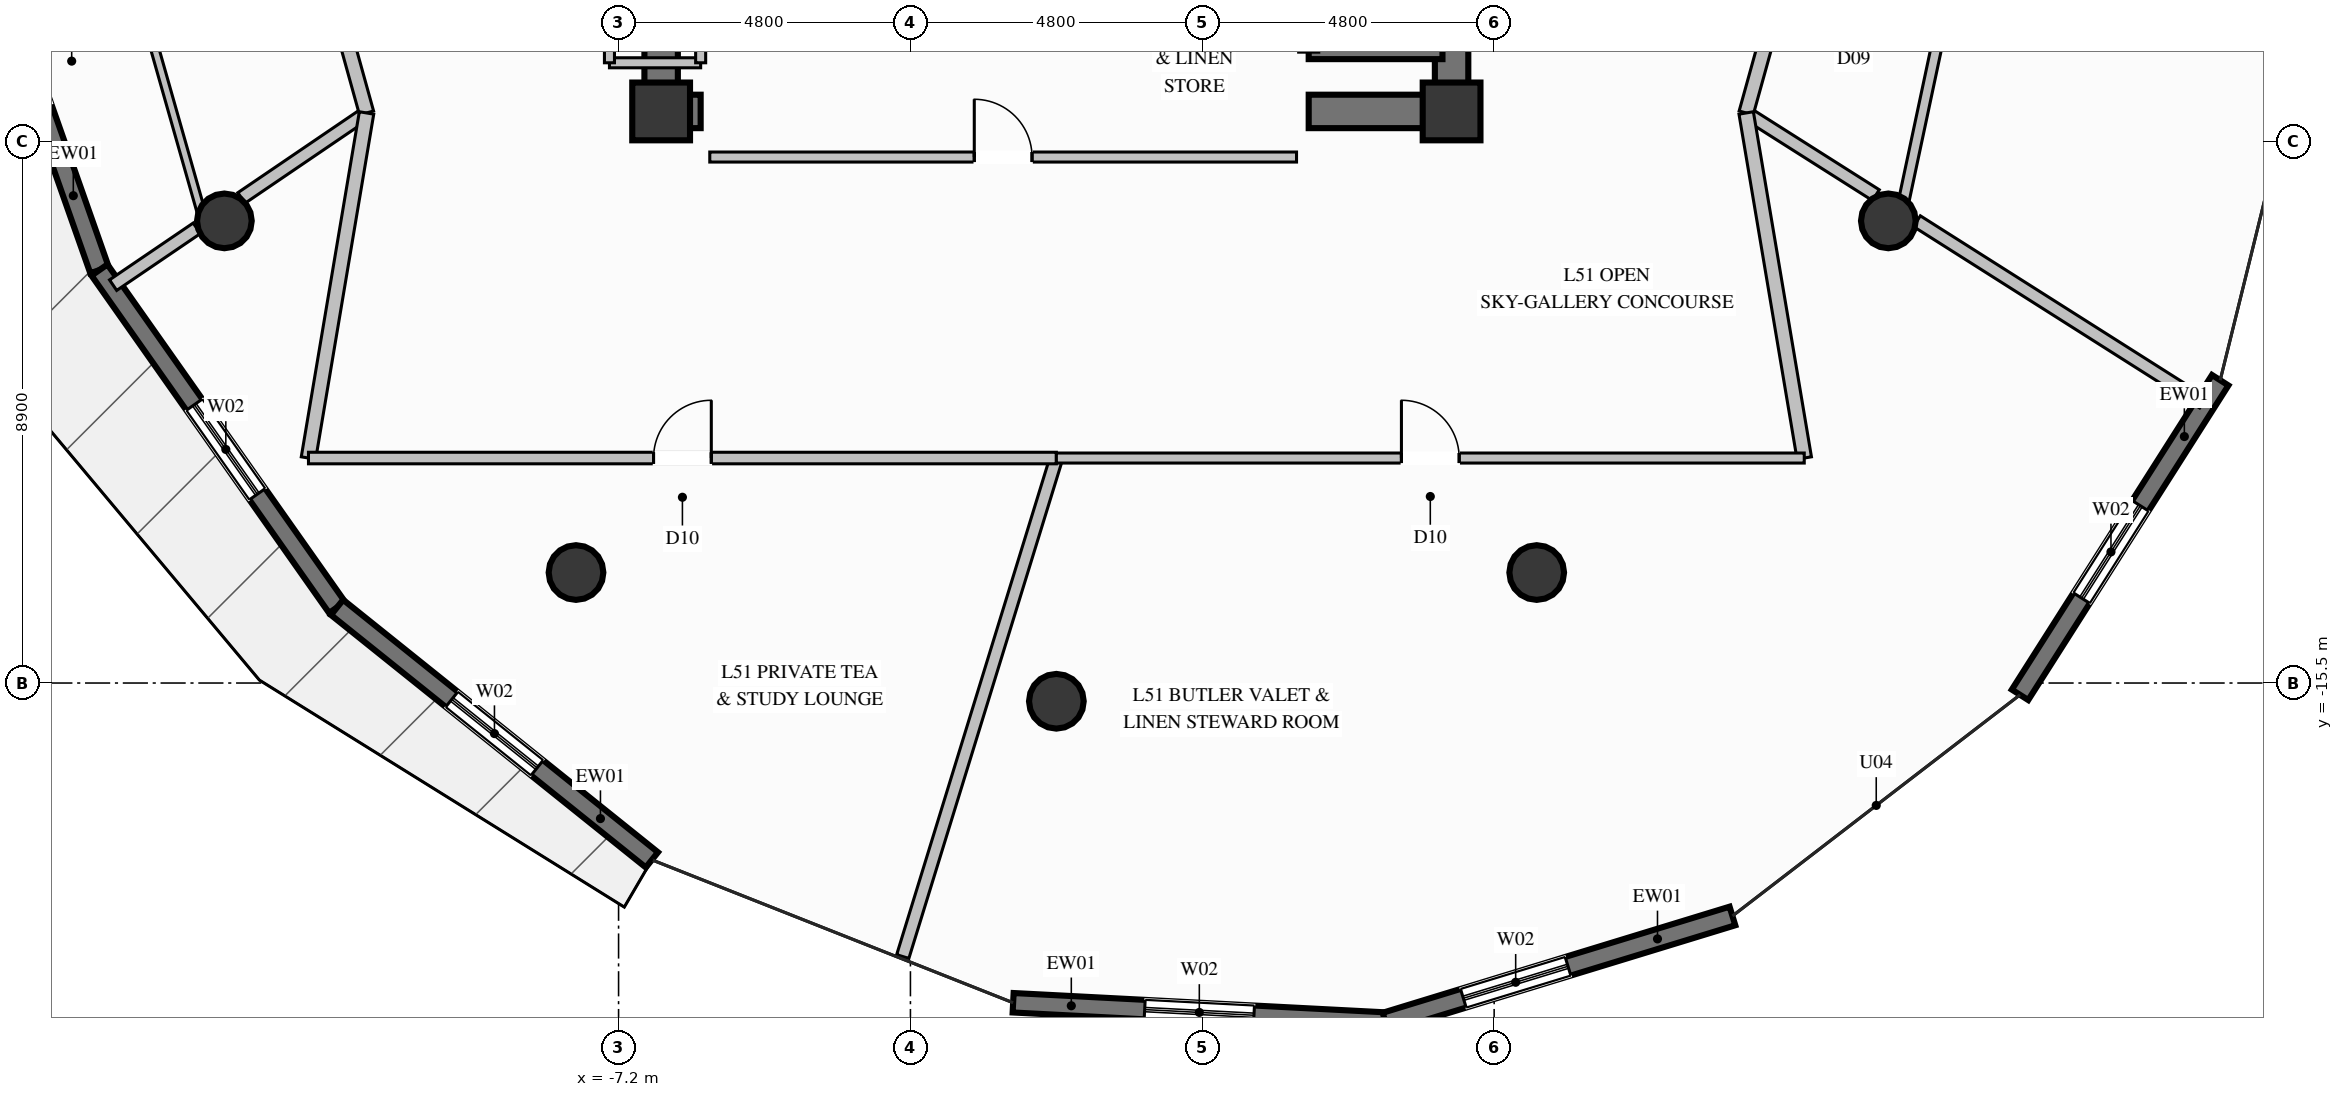
"""IFC4 building model, lengths in metres.
Left out: names, types, materials, properties, quantities, classifications, styles, units other than length and angle.
Written with IfcOpenShell. Run it as: python <this file> out.ifc"""

import sys

from ifc_helpers import new_model, si_unit, direction, frame, frame_2d, origin, origin_2d, place, context, subcontext, project, spatial, rectangle, circle, extrude, element, fill, save


model = new_model("IFC4")
c1 = context("Model", 3, precision=1e-05, world=origin(), true_north=direction((0.0, 1.0)))
c2 = subcontext(c1, "Body", "Model", "MODEL_VIEW")
j1 = project(units=[si_unit("LENGTHUNIT", "METRE"), si_unit("PLANEANGLEUNIT", "RADIAN")], contexts=[c1])
p1 = place(None, origin())
s1 = spatial("IfcSite", under=j1, at=p1, CompositionType="ELEMENT")
p2 = place(p1, origin())
s2 = spatial("IfcBuilding", under=s1, at=p2, CompositionType="ELEMENT")
p3 = place(p2, frame((0.0, 0.0, 198.4)))
s3 = spatial("IfcBuildingStorey", under=s2, at=p3, CompositionType="ELEMENT", Elevation=198.4)
for number, where, z_axis, x_axis in (
    (1, (-6.5, -6.1, 0.0), (0.0, 0.0, 1.0), (1.0, 0.0, 0.0)),
    (2, (6.5, -6.1, 0.0), (0.0, 0.0, 1.0), (1.0, 0.0, 0.0)),
):
    element("IfcColumn", number, at=place(p3, frame(where, z_axis=z_axis, x_axis=x_axis)), inside=s3, PredefinedType="COLUMN", context=c2, shape_type="SweptSolid", body=[
        extrude(rectangle(XDim=0.95, YDim=0.95, at=origin_2d()), origin(), (0.0, 0.0, 1.0), 3.6),
    ])
p4 = place(p3, frame((-6.225, -6.1, 0.0), z_axis=(0.0, 0.0, 1.0), x_axis=(1.0, 0.0, 0.0)))
e3 = element("IfcWall", 3, at=p4, inside=s3, PredefinedType="SHEAR", context=c2, shape_type="SweptSolid", body=[
    extrude(rectangle(XDim=0.375, YDim=0.55, at=frame_2d((0.188, 0.0))), origin(), (0.0, 0.0, 1.0), 3.6),
])
p5 = place(p3, frame((4.15, -6.1, 0.0), z_axis=(0.0, 0.0, 1.0), x_axis=(1.0, 0.0, 0.0)))
e4 = element("IfcWall", 4, at=p5, inside=s3, PredefinedType="SHEAR", context=c2, shape_type="SweptSolid", body=[
    extrude(rectangle(XDim=2.075, YDim=0.55, at=frame_2d((1.038, 0.0))), origin(), (0.0, 0.0, 1.0), 3.6),
])
p6 = place(p3, frame((-6.5, -6.375, 0.0), z_axis=(0.0, 0.0, 1.0), x_axis=(0.0, 1.0, 0.0)))
e5 = element("IfcWall", 5, at=p6, inside=s3, PredefinedType="SHEAR", context=c2, shape_type="SweptSolid", body=[
    extrude(rectangle(XDim=3.025, YDim=0.55, at=frame_2d((1.512, 0.0))), origin(), (0.0, 0.0, 1.0), 3.6),
])
p7 = place(p3, frame((6.5, -6.375, 0.0), z_axis=(0.0, 0.0, 1.0), x_axis=(0.0, 1.0, 0.0)))
e6 = element("IfcWall", 6, at=p7, inside=s3, PredefinedType="SHEAR", context=c2, shape_type="SweptSolid", body=[
    extrude(rectangle(XDim=4.025, YDim=0.55, at=frame_2d((2.012, 0.0))), origin(), (0.0, 0.0, 1.0), 3.6),
])
for number, where, z_axis, x_axis in (
    (7, (-13.683, -7.9, 0.0), (0.0, 0.0, 1.0), (1.0, 0.0, 0.0)),
    (8, (-7.9, -13.683, 0.0), (0.0, 0.0, 1.0), (1.0, 0.0, 0.0)),
    (9, (0.0, -15.8, 0.0), (0.0, 0.0, 1.0), (1.0, 0.0, 0.0)),
    (10, (7.9, -13.683, 0.0), (0.0, 0.0, 1.0), (1.0, 0.0, 0.0)),
    (11, (13.683, -7.9, 0.0), (0.0, 0.0, 1.0), (1.0, 0.0, 0.0)),
):
    element("IfcColumn", number, at=place(p3, frame(where, z_axis=z_axis, x_axis=x_axis)), inside=s3, PredefinedType="COLUMN", context=c2, shape_type="SweptSolid", body=[
        extrude(circle(Radius=0.45, at=origin_2d()), origin(), (0.0, 0.0, 1.0), 3.6),
    ])
p8 = place(p3, frame((19.141, -10.52, 0.0), z_axis=(0.0, 0.0, 1.0), x_axis=(-0.536805938934, -0.843705744869, 0.0)))
e12 = element("IfcWall", 12, at=p8, inside=s3, PredefinedType="SOLIDWALL", context=c2, shape_type="SweptSolid", body=[
    extrude(rectangle(XDim=6.133, YDim=0.32, at=frame_2d((3.066, 0.0))), origin(), (0.0, 0.0, 1.0), 3.36),
])
p9 = place(p8, frame((2.447, 0.0, 0.35)))
e13 = element("IfcOpeningElement", 13, at=p9, cuts=e12, PredefinedType="OPENING", context=c2, shape_type="SweptSolid", body=[
    extrude(rectangle(XDim=1.8, YDim=2.6, at=frame_2d((0.9, 1.3))), frame((0.0, 0.17, 0.0), z_axis=(0.0, -1.0, 0.0), x_axis=(1.0, 0.0, 0.0)), (0.0, 0.0, 1.0), 0.34),
])
p10 = place(p3, frame((-15.737, -8.708, 0.0), z_axis=(0.0, 0.0, 1.0), x_axis=(-0.332225226194, 0.94320008433, 0.0)))
e14 = element("IfcWall", 14, at=p10, inside=s3, PredefinedType="SOLIDWALL", context=c2, shape_type="SweptSolid", body=[
    extrude(rectangle(XDim=6.784, YDim=0.32, at=frame_2d((3.392, 0.0))), origin(), (0.0, 0.0, 1.0), 3.36),
])
p11 = place(p10, frame((4.488, 0.0, 0.35)))
e15 = element("IfcOpeningElement", 15, at=p11, cuts=e14, PredefinedType="OPENING", context=c2, shape_type="SweptSolid", body=[
    extrude(rectangle(XDim=1.8, YDim=2.6, at=frame_2d((0.9, 1.3))), frame((0.0, 0.17, 0.0), z_axis=(0.0, -1.0, 0.0), x_axis=(1.0, 0.0, 0.0)), (0.0, 0.0, 1.0), 0.34),
])
p12 = place(p10, frame((2.842, 0.0, 0.0)))
e16 = element("IfcOpeningElement", 16, at=p12, cuts=e14, PredefinedType="OPENING", context=c2, shape_type="SweptSolid", body=[
    extrude(rectangle(XDim=1.1, YDim=2.2, at=frame_2d((0.55, 1.1))), frame((0.0, 0.17, 0.0), z_axis=(0.0, -1.0, 0.0), x_axis=(1.0, 0.0, 0.0)), (0.0, 0.0, 1.0), 0.34),
])
p13 = place(p3, frame((-11.83, -14.256, 0.0), z_axis=(0.0, 0.0, 1.0), x_axis=(-0.575766085624, 0.817614465775, 0.0)))
e17 = element("IfcWall", 17, at=p13, inside=s3, PredefinedType="SOLIDWALL", context=c2, shape_type="SweptSolid", body=[
    extrude(rectangle(XDim=6.786, YDim=0.32, at=frame_2d((3.393, 0.0))), origin(), (0.0, 0.0, 1.0), 3.36),
])
p14 = place(p13, frame((2.277, 0.0, 0.35)))
e18 = element("IfcOpeningElement", 18, at=p14, cuts=e17, PredefinedType="OPENING", context=c2, shape_type="SweptSolid", body=[
    extrude(rectangle(XDim=1.8, YDim=2.6, at=frame_2d((0.9, 1.3))), frame((0.0, 0.17, 0.0), z_axis=(0.0, -1.0, 0.0), x_axis=(1.0, 0.0, 0.0)), (0.0, 0.0, 1.0), 0.34),
])
p15 = place(p3, frame((-6.652, -18.408, 0.0), z_axis=(0.0, 0.0, 1.0), x_axis=(-0.780172101925, 0.625564937778, 0.0)))
e19 = element("IfcWall", 19, at=p15, inside=s3, PredefinedType="SOLIDWALL", context=c2, shape_type="SweptSolid", body=[
    extrude(rectangle(XDim=6.637, YDim=0.32, at=frame_2d((3.318, 0.0))), origin(), (0.0, 0.0, 1.0), 3.36),
])
p16 = place(p15, frame((2.419, 0.0, 0.35)))
e20 = element("IfcOpeningElement", 20, at=p16, cuts=e19, PredefinedType="OPENING", context=c2, shape_type="SweptSolid", body=[
    extrude(rectangle(XDim=1.8, YDim=2.6, at=frame_2d((0.9, 1.3))), frame((0.0, 0.17, 0.0), z_axis=(0.0, -1.0, 0.0), x_axis=(1.0, 0.0, 0.0)), (0.0, 0.0, 1.0), 0.34),
])
p17 = place(p3, frame((5.413, -21.076, 0.0), z_axis=(0.0, 0.0, 1.0), x_axis=(-0.998655620393, 0.051835816367, 0.0)))
e21 = element("IfcWall", 21, at=p17, inside=s3, PredefinedType="SOLIDWALL", context=c2, shape_type="SweptSolid", body=[
    extrude(rectangle(XDim=6.132, YDim=0.32, at=frame_2d((3.066, 0.0))), origin(), (0.0, 0.0, 1.0), 3.36),
])
p18 = place(p17, frame((2.166, 0.0, 0.35)))
e22 = element("IfcOpeningElement", 22, at=p18, cuts=e21, PredefinedType="OPENING", context=c2, shape_type="SweptSolid", body=[
    extrude(rectangle(XDim=1.8, YDim=2.6, at=frame_2d((0.9, 1.3))), frame((0.0, 0.17, 0.0), z_axis=(0.0, -1.0, 0.0), x_axis=(1.0, 0.0, 0.0)), (0.0, 0.0, 1.0), 0.34),
])
p19 = place(p3, frame((11.119, -19.331, 0.0), z_axis=(0.0, 0.0, 1.0), x_axis=(-0.956284524247, -0.292437871498, 0.0)))
e23 = element("IfcWall", 23, at=p19, inside=s3, PredefinedType="SOLIDWALL", context=c2, shape_type="SweptSolid", body=[
    extrude(rectangle(XDim=5.967, YDim=0.32, at=frame_2d((2.983, 0.0))), origin(), (0.0, 0.0, 1.0), 3.36),
])
p20 = place(p19, frame((2.828, 0.0, 0.35)))
e24 = element("IfcOpeningElement", 24, at=p20, cuts=e23, PredefinedType="OPENING", context=c2, shape_type="SweptSolid", body=[
    extrude(rectangle(XDim=1.8, YDim=2.6, at=frame_2d((0.9, 1.3))), frame((0.0, 0.17, 0.0), z_axis=(0.0, -1.0, 0.0), x_axis=(1.0, 0.0, 0.0)), (0.0, 0.0, 1.0), 0.34),
])
p21 = place(p3, frame((4.15, -5.1, 0.0), z_axis=(0.0, 0.0, 1.0), x_axis=(1.0, 0.0, 0.0)))
e25 = element("IfcWall", 25, at=p21, inside=s3, PredefinedType="SOLIDWALL", context=c2, shape_type="SweptSolid", body=[
    extrude(rectangle(XDim=2.2, YDim=0.28, at=frame_2d((1.1, 0.0))), origin(), (0.0, 0.0, 1.0), 3.36),
])
p22 = place(p3, frame((-7.35, -5.3, 0.0), z_axis=(0.0, 0.0, 1.0), x_axis=(1.0, 0.0, 0.0)))
e26 = element("IfcWall", 26, at=p22, inside=s3, PredefinedType="PARTITIONING", context=c2, shape_type="SweptSolid", body=[
    extrude(rectangle(XDim=1.5, YDim=0.165, at=frame_2d((0.75, 0.0))), origin(), (0.0, 0.0, 1.0), 2.445),
])
p23 = place(p3, frame((-5.85, -5.3, 0.0), z_axis=(0.0, 0.0, 1.0), x_axis=(0.0, 1.0, 0.0)))
e27 = element("IfcWall", 27, at=p23, inside=s3, PredefinedType="PARTITIONING", context=c2, shape_type="SweptSolid", body=[
    extrude(rectangle(XDim=2.5, YDim=0.165, at=frame_2d((1.25, 0.0))), origin(), (0.0, 0.0, 1.0), 2.445),
])
p24 = place(p3, frame((-7.35, -2.8, 0.0), z_axis=(0.0, 0.0, 1.0), x_axis=(0.0, -1.0, 0.0)))
e28 = element("IfcWall", 28, at=p24, inside=s3, PredefinedType="PARTITIONING", context=c2, shape_type="SweptSolid", body=[
    extrude(rectangle(XDim=2.5, YDim=0.165, at=frame_2d((1.25, 0.0))), origin(), (0.0, 0.0, 1.0), 3.36),
])
p25 = place(p24, frame((0.775, 0.0, 0.0)))
e29 = element("IfcOpeningElement", 29, at=p25, cuts=e28, PredefinedType="OPENING", context=c2, shape_type="SweptSolid", body=[
    extrude(rectangle(XDim=0.95, YDim=2.1, at=frame_2d((0.475, 1.05))), frame((0.0, 0.093, 0.0), z_axis=(0.0, -1.0, 0.0), x_axis=(1.0, 0.0, 0.0)), (0.0, 0.0, 1.0), 0.185),
])
p26 = place(p3, frame((-5.7, -6.85, 0.0), z_axis=(0.0, 0.0, 1.0), x_axis=(1.0, 0.0, 0.0)))
e30 = element("IfcWall", 30, at=p26, inside=s3, PredefinedType="PARTITIONING", context=c2, shape_type="SweptSolid", body=[
    extrude(rectangle(XDim=9.65, YDim=0.165, at=frame_2d((4.825, 0.0))), origin(), (0.0, 0.0, 1.0), 2.445),
])
p27 = place(p26, frame((4.35, 0.0, 0.0)))
e31 = element("IfcOpeningElement", 31, at=p27, cuts=e30, PredefinedType="OPENING", context=c2, shape_type="SweptSolid", body=[
    extrude(rectangle(XDim=0.95, YDim=2.1, at=frame_2d((0.475, 1.05))), frame((0.0, 0.093, 0.0), z_axis=(0.0, -1.0, 0.0), x_axis=(1.0, 0.0, 0.0)), (0.0, 0.0, 1.0), 0.185),
])
p28 = place(p3, frame((-11.345, -6.125, 0.0), z_axis=(0.0, 0.0, 1.0), x_axis=(-0.827094432266, -0.562062985896, 0.0)))
e32 = element("IfcWall", 32, at=p28, inside=s3, PredefinedType="PARTITIONING", context=c2, shape_type="SweptSolid", body=[
    extrude(rectangle(XDim=2.487, YDim=0.21, at=frame_2d((1.244, 0.0))), origin(), (0.0, 0.0, 1.0), 2.876),
])
p29 = place(p3, frame((-14.137, -8.022, 0.0), z_axis=(0.0, 0.0, 1.0), x_axis=(-0.827095695336, -0.562061127242, 0.0)))
e33 = element("IfcWall", 33, at=p29, inside=s3, PredefinedType="PARTITIONING", context=c2, shape_type="SweptSolid", body=[
    extrude(rectangle(XDim=1.664, YDim=0.21, at=frame_2d((0.832, 0.0))), origin(), (0.0, 0.0, 1.0), 3.36),
])
p30 = place(p3, frame((11.345, -6.125, 0.0), z_axis=(0.0, 0.0, 1.0), x_axis=(0.844619463995, -0.535367127344, 0.0)))
e34 = element("IfcWall", 34, at=p30, inside=s3, PredefinedType="PARTITIONING", context=c2, shape_type="SweptSolid", body=[
    extrude(rectangle(XDim=2.525, YDim=0.21, at=frame_2d((1.263, 0.0))), origin(), (0.0, 0.0, 1.0), 2.876),
])
p31 = place(p3, frame((14.153, -7.905, 0.0), z_axis=(0.0, 0.0, 1.0), x_axis=(0.844611036589, -0.535380422571, 0.0)))
e35 = element("IfcWall", 35, at=p31, inside=s3, PredefinedType="PARTITIONING", context=c2, shape_type="SweptSolid", body=[
    extrude(rectangle(XDim=5.572, YDim=0.21, at=frame_2d((2.786, 0.0))), origin(), (0.0, 0.0, 1.0), 3.36),
])
p32 = place(p3, frame((-13.1, 0.2, 0.0), z_axis=(0.0, 0.0, 1.0), x_axis=(0.26738871748, -0.963588747218, 0.0)))
e36 = element("IfcWall", 36, at=p32, inside=s3, PredefinedType="PARTITIONING", context=c2, shape_type="SweptSolid", body=[
    extrude(rectangle(XDim=6.564, YDim=0.24, at=frame_2d((3.282, 0.0))), origin(), (0.0, 0.0, 1.0), 3.36),
])
p33 = place(p3, frame((-16.289, 0.072, 0.0), z_axis=(0.0, 0.0, 1.0), x_axis=(0.273369276922, -0.961909163297, 0.0)))
e37 = element("IfcWall", 37, at=p33, inside=s3, PredefinedType="PARTITIONING", context=c2, shape_type="SweptSolid", body=[
    extrude(rectangle(XDim=8.326, YDim=0.135, at=frame_2d((4.163, 0.0))), origin(), (0.0, 0.0, 1.0), 2.929),
])
p34 = place(p33, frame((3.688, 0.0, 0.0)))
e38 = element("IfcOpeningElement", 38, at=p34, cuts=e37, PredefinedType="OPENING", context=c2, shape_type="SweptSolid", body=[
    extrude(rectangle(XDim=0.95, YDim=2.1, at=frame_2d((0.475, 1.05))), frame((0.0, 0.078, 0.0), z_axis=(0.0, -1.0, 0.0), x_axis=(1.0, 0.0, 0.0)), (0.0, 0.0, 1.0), 0.155),
])
p35 = place(p3, frame((11.345, -6.125, 0.0), z_axis=(0.0, 0.0, 1.0), x_axis=(0.267401739017, 0.963585133743, 0.0)))
e39 = element("IfcWall", 39, at=p35, inside=s3, PredefinedType="PARTITIONING", context=c2, shape_type="SweptSolid", body=[
    extrude(rectangle(XDim=2.756, YDim=0.24, at=frame_2d((1.378, 0.0))), origin(), (0.0, 0.0, 1.0), 3.36),
])
p36 = place(p3, frame((13.9, -7.744, 0.0), z_axis=(0.0, 0.0, 1.0), x_axis=(0.208251685577, 0.978075270853, 0.0)))
e40 = element("IfcWall", 40, at=p36, inside=s3, PredefinedType="PLUMBINGWALL", context=c2, shape_type="SweptSolid", body=[
    extrude(rectangle(XDim=3.381, YDim=0.175, at=frame_2d((1.69, 0.0))), origin(), (0.0, 0.0, 1.0), 2.929),
])
p37 = place(p3, frame((0.0, -11.8, 0.0), z_axis=(0.0, 0.0, 1.0), x_axis=(-0.294449811114, -0.955666944461, 0.0)))
e41 = element("IfcWall", 41, at=p37, inside=s3, PredefinedType="PARTITIONING", context=c2, shape_type="SweptSolid", body=[
    extrude(rectangle(XDim=8.578, YDim=0.21, at=frame_2d((4.289, 0.0))), origin(), (0.0, 0.0, 1.0), 3.36),
])
p38 = place(p3, frame((-11.345, -6.125, 0.0), z_axis=(0.0, 0.0, 1.0), x_axis=(-0.165960421789, -0.986132414232, 0.0)))
e42 = element("IfcWall", 42, at=p38, inside=s3, PredefinedType="PARTITIONING", context=c2, shape_type="SweptSolid", body=[
    extrude(rectangle(XDim=5.755, YDim=0.24, at=frame_2d((2.877, 0.0))), origin(), (0.0, 0.0, 1.0), 3.36),
])
p39 = place(p3, frame((-12.3, -11.8, 0.0), z_axis=(0.0, 0.0, 1.0), x_axis=(1.0, 0.0, 0.0)))
e43 = element("IfcWall", 43, at=p39, inside=s3, PredefinedType="PARTITIONING", context=c2, shape_type="SweptSolid", body=[
    extrude(rectangle(XDim=12.3, YDim=0.19, at=frame_2d((6.15, 0.0))), origin(), (0.0, 0.0, 1.0), 3.36),
])
p40 = place(p39, frame((5.675, 0.0, 0.0)))
e44 = element("IfcOpeningElement", 44, at=p40, cuts=e43, PredefinedType="OPENING", context=c2, shape_type="SweptSolid", body=[
    extrude(rectangle(XDim=0.95, YDim=2.1, at=frame_2d((0.475, 1.05))), frame((0.0, 0.105, 0.0), z_axis=(0.0, -1.0, 0.0), x_axis=(1.0, 0.0, 0.0)), (0.0, 0.0, 1.0), 0.21),
])
p41 = place(p3, frame((12.3, -11.8, 0.0), z_axis=(0.0, 0.0, 1.0), x_axis=(-0.165960421789, 0.986132414232, 0.0)))
e45 = element("IfcWall", 45, at=p41, inside=s3, PredefinedType="PARTITIONING", context=c2, shape_type="SweptSolid", body=[
    extrude(rectangle(XDim=5.755, YDim=0.24, at=frame_2d((2.877, 0.0))), origin(), (0.0, 0.0, 1.0), 3.36),
])
p42 = place(p3, frame((0.0, -11.8, 0.0), z_axis=(0.0, 0.0, 1.0), x_axis=(1.0, 0.0, 0.0)))
e46 = element("IfcWall", 46, at=p42, inside=s3, PredefinedType="PARTITIONING", context=c2, shape_type="SweptSolid", body=[
    extrude(rectangle(XDim=12.3, YDim=0.165, at=frame_2d((6.15, 0.0))), origin(), (0.0, 0.0, 1.0), 3.36),
])
p43 = place(p42, frame((5.675, 0.0, 0.0)))
e47 = element("IfcOpeningElement", 47, at=p43, cuts=e46, PredefinedType="OPENING", context=c2, shape_type="SweptSolid", body=[
    extrude(rectangle(XDim=0.95, YDim=2.1, at=frame_2d((0.475, 1.05))), frame((0.0, 0.093, 0.0), z_axis=(0.0, -1.0, 0.0), x_axis=(1.0, 0.0, 0.0)), (0.0, 0.0, 1.0), 0.185),
])
p44 = place(p9, origin())
e48 = element("IfcWindow", 48, at=p44, inside=s3, PartitioningType="SINGLE_PANEL", PredefinedType="WINDOW", context=c2, shape_type="SweptSolid", body=[
    extrude(rectangle(XDim=1.8, YDim=2.6, at=frame_2d((0.9, 1.3))), frame((0.0, 0.03, 0.0), z_axis=(0.0, -1.0, 0.0), x_axis=(1.0, 0.0, 0.0)), (0.0, 0.0, 1.0), 0.06),
])
fill(e13, e48)
p45 = place(p14, origin())
e49 = element("IfcWindow", 49, at=p45, inside=s3, PartitioningType="SINGLE_PANEL", PredefinedType="WINDOW", context=c2, shape_type="SweptSolid", body=[
    extrude(rectangle(XDim=1.8, YDim=2.6, at=frame_2d((0.9, 1.3))), frame((0.0, 0.03, 0.0), z_axis=(0.0, -1.0, 0.0), x_axis=(1.0, 0.0, 0.0)), (0.0, 0.0, 1.0), 0.06),
])
fill(e18, e49)
p46 = place(p16, origin())
e50 = element("IfcWindow", 50, at=p46, inside=s3, PartitioningType="SINGLE_PANEL", PredefinedType="WINDOW", context=c2, shape_type="SweptSolid", body=[
    extrude(rectangle(XDim=1.8, YDim=2.6, at=frame_2d((0.9, 1.3))), frame((0.0, 0.03, 0.0), z_axis=(0.0, -1.0, 0.0), x_axis=(1.0, 0.0, 0.0)), (0.0, 0.0, 1.0), 0.06),
])
fill(e20, e50)
p47 = place(p18, origin())
e51 = element("IfcWindow", 51, at=p47, inside=s3, PartitioningType="SINGLE_PANEL", PredefinedType="WINDOW", context=c2, shape_type="SweptSolid", body=[
    extrude(rectangle(XDim=1.8, YDim=2.6, at=frame_2d((0.9, 1.3))), frame((0.0, 0.03, 0.0), z_axis=(0.0, -1.0, 0.0), x_axis=(1.0, 0.0, 0.0)), (0.0, 0.0, 1.0), 0.06),
])
fill(e22, e51)
p48 = place(p20, origin())
e52 = element("IfcWindow", 52, at=p48, inside=s3, PartitioningType="SINGLE_PANEL", PredefinedType="WINDOW", context=c2, shape_type="SweptSolid", body=[
    extrude(rectangle(XDim=1.8, YDim=2.6, at=frame_2d((0.9, 1.3))), frame((0.0, 0.03, 0.0), z_axis=(0.0, -1.0, 0.0), x_axis=(1.0, 0.0, 0.0)), (0.0, 0.0, 1.0), 0.06),
])
fill(e24, e52)
p49 = place(p27, origin())
e53 = element("IfcDoor", 53, at=p49, inside=s3, OperationType="SINGLE_SWING_LEFT", PredefinedType="DOOR", context=c2, shape_type="SweptSolid", body=[
    extrude(rectangle(XDim=0.95, YDim=2.1, at=frame_2d((0.475, 1.05))), frame((0.0, 0.025, 0.0), z_axis=(0.0, -1.0, 0.0), x_axis=(1.0, 0.0, 0.0)), (0.0, 0.0, 1.0), 0.05),
])
fill(e31, e53)
p50 = place(p40, origin())
e54 = element("IfcDoor", 54, at=p50, inside=s3, OperationType="SINGLE_SWING_RIGHT", PredefinedType="DOOR", context=c2, shape_type="SweptSolid", body=[
    extrude(rectangle(XDim=0.95, YDim=2.1, at=frame_2d((0.475, 1.05))), frame((0.0, 0.025, 0.0), z_axis=(0.0, -1.0, 0.0), x_axis=(1.0, 0.0, 0.0)), (0.0, 0.0, 1.0), 0.05),
])
fill(e44, e54)
p51 = place(p43, origin())
e55 = element("IfcDoor", 55, at=p51, inside=s3, OperationType="SINGLE_SWING_LEFT", PredefinedType="DOOR", context=c2, shape_type="SweptSolid", body=[
    extrude(rectangle(XDim=0.95, YDim=2.1, at=frame_2d((0.475, 1.05))), frame((0.0, 0.025, 0.0), z_axis=(0.0, -1.0, 0.0), x_axis=(1.0, 0.0, 0.0)), (0.0, 0.0, 1.0), 0.05),
])
fill(e47, e55)
save(model, sys.argv[1])
